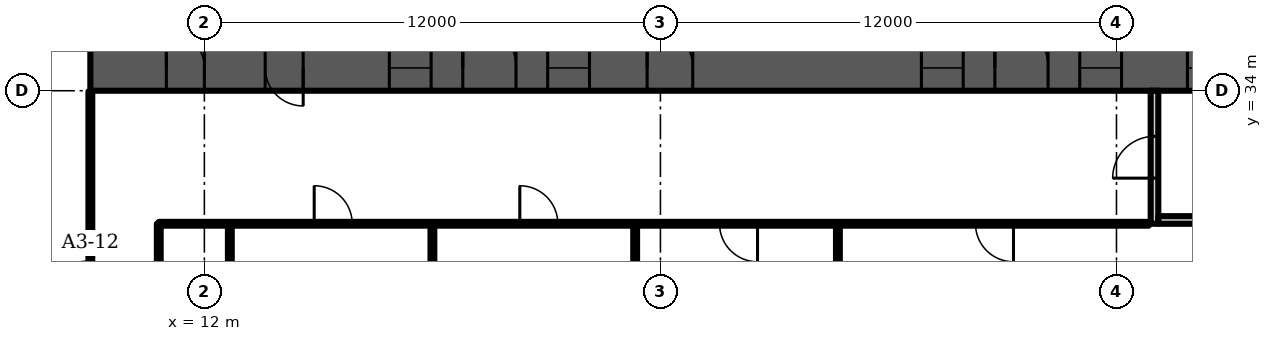
"""IFC4 building model, lengths in metres.
Left out: names, types, materials, properties, quantities, classifications, styles, units other than length and angle.
Written with IfcOpenShell. Run it as: python <this file> out.ifc"""

import sys

from ifc_helpers import new_model, si_unit, direction, frame, frame_2d, origin, place, context, subcontext, project, spatial, rectangle, extrude, element, fill, save


model = new_model("IFC4")
c1 = context("Model", 3, precision=1e-05, world=origin(), true_north=direction((0.0, 1.0)))
c2 = subcontext(c1, "Body", "Model", "MODEL_VIEW")
j1 = project(units=[si_unit("LENGTHUNIT", "METRE"), si_unit("PLANEANGLEUNIT", "RADIAN")], contexts=[c1])
p1 = place(None, origin())
s1 = spatial("IfcSite", under=j1, at=p1, CompositionType="ELEMENT")
p2 = place(p1, origin())
s2 = spatial("IfcBuilding", under=s1, at=p2, CompositionType="ELEMENT")
p3 = place(p2, frame((0.0, 0.0, 66.7)))
s3 = spatial("IfcBuildingStorey", under=s2, at=p3, CompositionType="ELEMENT", Elevation=66.7)
p4 = place(p3, frame((9.0, 34.6, 0.0), z_axis=(0.0, 0.0, 1.0), x_axis=(1.0, 0.0, 0.0)))
e1 = element("IfcWall", 1, at=p4, inside=s3, PredefinedType="SHEAR", context=c2, shape_type="SweptSolid", body=[
    extrude(rectangle(XDim=56.0, YDim=1.2, at=frame_2d((28.0, 0.0))), origin(), (0.0, 0.0, 1.0), 3.6),
])
p5 = place(p4, frame((2.0, 0.0, 0.0)))
e2 = element("IfcOpeningElement", 2, at=p5, cuts=e1, PredefinedType="OPENING", context=c2, shape_type="SweptSolid", body=[
    extrude(rectangle(XDim=1.0, YDim=2.1, at=frame_2d((0.5, 1.05))), frame((0.0, 0.61, 0.0), z_axis=(0.0, -1.0, 0.0), x_axis=(1.0, 0.0, 0.0)), (0.0, 0.0, 1.0), 1.22),
])
p6 = place(p4, frame((4.6, 0.0, 0.0)))
e3 = element("IfcOpeningElement", 3, at=p6, cuts=e1, PredefinedType="OPENING", context=c2, shape_type="SweptSolid", body=[
    extrude(rectangle(XDim=1.0, YDim=2.1, at=frame_2d((0.5, 1.05))), frame((0.0, 0.61, 0.0), z_axis=(0.0, -1.0, 0.0), x_axis=(1.0, 0.0, 0.0)), (0.0, 0.0, 1.0), 1.22),
])
p7 = place(p4, frame((7.867, 0.0, 0.0)))
e4 = element("IfcOpeningElement", 4, at=p7, cuts=e1, PredefinedType="OPENING", context=c2, shape_type="SweptSolid", body=[
    extrude(rectangle(XDim=1.1, YDim=2.1, at=frame_2d((0.55, 1.05))), frame((0.0, 0.61, 0.0), z_axis=(0.0, -1.0, 0.0), x_axis=(1.0, 0.0, 0.0)), (0.0, 0.0, 1.0), 1.22),
])
p8 = place(p4, frame((12.033, 0.0, 0.0)))
e5 = element("IfcOpeningElement", 5, at=p8, cuts=e1, PredefinedType="OPENING", context=c2, shape_type="SweptSolid", body=[
    extrude(rectangle(XDim=1.1, YDim=2.1, at=frame_2d((0.55, 1.05))), frame((0.0, 0.61, 0.0), z_axis=(0.0, -1.0, 0.0), x_axis=(1.0, 0.0, 0.0)), (0.0, 0.0, 1.0), 1.22),
])
p9 = place(p4, frame((9.8, 0.0, 0.0)))
e6 = element("IfcOpeningElement", 6, at=p9, cuts=e1, PredefinedType="OPENING", context=c2, shape_type="SweptSolid", body=[
    extrude(rectangle(XDim=1.4, YDim=2.1, at=frame_2d((0.7, 1.05))), frame((0.0, 0.61, 0.0), z_axis=(0.0, -1.0, 0.0), x_axis=(1.0, 0.0, 0.0)), (0.0, 0.0, 1.0), 1.22),
])
p10 = place(p4, frame((14.65, 0.0, 0.0)))
e7 = element("IfcOpeningElement", 7, at=p10, cuts=e1, PredefinedType="OPENING", context=c2, shape_type="SweptSolid", body=[
    extrude(rectangle(XDim=1.2, YDim=2.1, at=frame_2d((0.6, 1.05))), frame((0.0, 0.61, 0.0), z_axis=(0.0, -1.0, 0.0), x_axis=(1.0, 0.0, 0.0)), (0.0, 0.0, 1.0), 1.22),
])
p11 = place(p4, frame((21.867, 0.0, 0.0)))
e8 = element("IfcOpeningElement", 8, at=p11, cuts=e1, PredefinedType="OPENING", context=c2, shape_type="SweptSolid", body=[
    extrude(rectangle(XDim=1.1, YDim=2.1, at=frame_2d((0.55, 1.05))), frame((0.0, 0.61, 0.0), z_axis=(0.0, -1.0, 0.0), x_axis=(1.0, 0.0, 0.0)), (0.0, 0.0, 1.0), 1.22),
])
p12 = place(p4, frame((26.033, 0.0, 0.0)))
e9 = element("IfcOpeningElement", 9, at=p12, cuts=e1, PredefinedType="OPENING", context=c2, shape_type="SweptSolid", body=[
    extrude(rectangle(XDim=1.1, YDim=2.1, at=frame_2d((0.55, 1.05))), frame((0.0, 0.61, 0.0), z_axis=(0.0, -1.0, 0.0), x_axis=(1.0, 0.0, 0.0)), (0.0, 0.0, 1.0), 1.22),
])
p13 = place(p4, frame((23.8, 0.0, 0.0)))
e10 = element("IfcOpeningElement", 10, at=p13, cuts=e1, PredefinedType="OPENING", context=c2, shape_type="SweptSolid", body=[
    extrude(rectangle(XDim=1.4, YDim=2.1, at=frame_2d((0.7, 1.05))), frame((0.0, 0.61, 0.0), z_axis=(0.0, -1.0, 0.0), x_axis=(1.0, 0.0, 0.0)), (0.0, 0.0, 1.0), 1.22),
])
p14 = place(p4, frame((28.867, 0.0, 0.0)))
e11 = element("IfcOpeningElement", 11, at=p14, cuts=e1, PredefinedType="OPENING", context=c2, shape_type="SweptSolid", body=[
    extrude(rectangle(XDim=1.1, YDim=2.1, at=frame_2d((0.55, 1.05))), frame((0.0, 0.61, 0.0), z_axis=(0.0, -1.0, 0.0), x_axis=(1.0, 0.0, 0.0)), (0.0, 0.0, 1.0), 1.22),
])
p15 = place(p4, frame((33.033, 0.0, 0.0)))
e12 = element("IfcOpeningElement", 12, at=p15, cuts=e1, PredefinedType="OPENING", context=c2, shape_type="SweptSolid", body=[
    extrude(rectangle(XDim=1.1, YDim=2.1, at=frame_2d((0.55, 1.05))), frame((0.0, 0.61, 0.0), z_axis=(0.0, -1.0, 0.0), x_axis=(1.0, 0.0, 0.0)), (0.0, 0.0, 1.0), 1.22),
])
p16 = place(p4, frame((40.15, 0.0, 0.0)))
e13 = element("IfcOpeningElement", 13, at=p16, cuts=e1, PredefinedType="OPENING", context=c2, shape_type="SweptSolid", body=[
    extrude(rectangle(XDim=1.2, YDim=2.1, at=frame_2d((0.6, 1.05))), frame((0.0, 0.61, 0.0), z_axis=(0.0, -1.0, 0.0), x_axis=(1.0, 0.0, 0.0)), (0.0, 0.0, 1.0), 1.22),
])
p17 = place(p4, frame((44.8, 0.0, 0.0)))
e14 = element("IfcOpeningElement", 14, at=p17, cuts=e1, PredefinedType="OPENING", context=c2, shape_type="SweptSolid", body=[
    extrude(rectangle(XDim=1.4, YDim=2.1, at=frame_2d((0.7, 1.05))), frame((0.0, 0.61, 0.0), z_axis=(0.0, -1.0, 0.0), x_axis=(1.0, 0.0, 0.0)), (0.0, 0.0, 1.0), 1.22),
])
p18 = place(p4, frame((49.867, 0.0, 0.0)))
e15 = element("IfcOpeningElement", 15, at=p18, cuts=e1, PredefinedType="OPENING", context=c2, shape_type="SweptSolid", body=[
    extrude(rectangle(XDim=1.1, YDim=2.1, at=frame_2d((0.55, 1.05))), frame((0.0, 0.61, 0.0), z_axis=(0.0, -1.0, 0.0), x_axis=(1.0, 0.0, 0.0)), (0.0, 0.0, 1.0), 1.22),
])
p19 = place(p4, frame((53.5, 0.0, 0.0)))
e16 = element("IfcOpeningElement", 16, at=p19, cuts=e1, PredefinedType="OPENING", context=c2, shape_type="SweptSolid", body=[
    extrude(rectangle(XDim=1.1, YDim=2.1, at=frame_2d((0.55, 1.05))), frame((0.0, 0.61, 0.0), z_axis=(0.0, -1.0, 0.0), x_axis=(1.0, 0.0, 0.0)), (0.0, 0.0, 1.0), 1.22),
])
p20 = place(p4, frame((51.567, 0.0, 0.0)))
e17 = element("IfcOpeningElement", 17, at=p20, cuts=e1, PredefinedType="OPENING", context=c2, shape_type="SweptSolid", body=[
    extrude(rectangle(XDim=1.4, YDim=2.1, at=frame_2d((0.7, 1.05))), frame((0.0, 0.61, 0.0), z_axis=(0.0, -1.0, 0.0), x_axis=(1.0, 0.0, 0.0)), (0.0, 0.0, 1.0), 1.22),
])
p21 = place(p3, frame((37.0, 30.5, 0.0), z_axis=(0.0, 0.0, 1.0), x_axis=(0.0, 1.0, 0.0)))
e18 = element("IfcWall", 18, at=p21, inside=s3, PredefinedType="PARTITIONING", context=c2, shape_type="SweptSolid", body=[
    extrude(rectangle(XDim=3.5, YDim=0.2, at=frame_2d((1.75, 0.0))), origin(), (0.0, 0.0, 1.0), 3.2),
])
p22 = place(p21, frame((1.2, 0.0, 0.0)))
e19 = element("IfcOpeningElement", 19, at=p22, cuts=e18, PredefinedType="OPENING", context=c2, shape_type="SweptSolid", body=[
    extrude(rectangle(XDim=1.1, YDim=2.1, at=frame_2d((0.55, 1.05))), frame((0.0, 0.11, 0.0), z_axis=(0.0, -1.0, 0.0), x_axis=(1.0, 0.0, 0.0)), (0.0, 0.0, 1.0), 0.22),
])
p23 = place(p3, frame((37.1, 30.6, 0.0), z_axis=(0.0, 0.0, 1.0), x_axis=(1.0, 0.0, 0.0)))
e20 = element("IfcWall", 20, at=p23, inside=s3, PredefinedType="PARTITIONING", context=c2, shape_type="SweptSolid", body=[
    extrude(rectangle(XDim=2.8, YDim=0.2, at=frame_2d((1.4, 0.0))), origin(), (0.0, 0.0, 1.0), 3.2),
])
p24 = place(p3, frame((9.0, 26.02, 0.0), z_axis=(0.0, 0.0, 1.0), x_axis=(0.0, 1.0, 0.0)))
e21 = element("IfcWall", 21, at=p24, inside=s3, PredefinedType="PARTITIONING", context=c2, shape_type="SweptSolid", body=[
    extrude(rectangle(XDim=7.96, YDim=0.1, at=frame_2d((3.98, 0.0))), origin(), (0.0, 0.0, 1.0), 3.2),
])
p25 = place(p24, frame((1.7, 0.0, 0.0)))
e22 = element("IfcOpeningElement", 22, at=p25, cuts=e21, PredefinedType="OPENING", context=c2, shape_type="SweptSolid", body=[
    extrude(rectangle(XDim=1.8, YDim=2.1, at=frame_2d((0.9, 1.05))), frame((0.0, 0.06, 0.0), z_axis=(0.0, -1.0, 0.0), x_axis=(1.0, 0.0, 0.0)), (0.0, 0.0, 1.0), 0.12),
])
p26 = place(p3, frame((10.8, 21.35, 0.0), z_axis=(0.0, 0.0, 1.0), x_axis=(0.0, 1.0, 0.0)))
e23 = element("IfcWall", 23, at=p26, inside=s3, PredefinedType="PARTITIONING", context=c2, shape_type="SweptSolid", body=[
    extrude(rectangle(XDim=9.15, YDim=0.1, at=frame_2d((4.575, 0.0))), origin(), (0.0, 0.0, 1.0), 3.2),
])
p27 = place(p26, frame((3.62, 0.0, 0.0)))
e24 = element("IfcOpeningElement", 24, at=p27, cuts=e23, PredefinedType="OPENING", context=c2, shape_type="SweptSolid", body=[
    extrude(rectangle(XDim=1.8, YDim=2.1, at=frame_2d((0.9, 1.05))), frame((0.0, 0.06, 0.0), z_axis=(0.0, -1.0, 0.0), x_axis=(1.0, 0.0, 0.0)), (0.0, 0.0, 1.0), 0.12),
])
p28 = place(p3, frame((10.8, 30.5, 0.0), z_axis=(0.0, 0.0, 1.0), x_axis=(1.0, 0.0, 0.0)))
e25 = element("IfcWall", 25, at=p28, inside=s3, PredefinedType="PARTITIONING", context=c2, shape_type="SweptSolid", body=[
    extrude(rectangle(XDim=26.05, YDim=0.1, at=frame_2d((13.025, 0.0))), origin(), (0.0, 0.0, 1.0), 3.2),
])
p29 = place(p28, frame((4.09, 0.0, 0.0)))
e26 = element("IfcOpeningElement", 26, at=p29, cuts=e25, PredefinedType="OPENING", context=c2, shape_type="SweptSolid", body=[
    extrude(rectangle(XDim=1.0, YDim=2.1, at=frame_2d((0.5, 1.05))), frame((0.0, 0.06, 0.0), z_axis=(0.0, -1.0, 0.0), x_axis=(1.0, 0.0, 0.0)), (0.0, 0.0, 1.0), 0.12),
])
p30 = place(p28, frame((9.5, 0.0, 0.0)))
e27 = element("IfcOpeningElement", 27, at=p30, cuts=e25, PredefinedType="OPENING", context=c2, shape_type="SweptSolid", body=[
    extrude(rectangle(XDim=1.0, YDim=2.1, at=frame_2d((0.5, 1.05))), frame((0.0, 0.06, 0.0), z_axis=(0.0, -1.0, 0.0), x_axis=(1.0, 0.0, 0.0)), (0.0, 0.0, 1.0), 0.12),
])
p31 = place(p28, frame((14.755, 0.0, 0.0)))
e28 = element("IfcOpeningElement", 28, at=p31, cuts=e25, PredefinedType="OPENING", context=c2, shape_type="SweptSolid", body=[
    extrude(rectangle(XDim=1.0, YDim=2.1, at=frame_2d((0.5, 1.05))), frame((0.0, 0.06, 0.0), z_axis=(0.0, -1.0, 0.0), x_axis=(1.0, 0.0, 0.0)), (0.0, 0.0, 1.0), 0.12),
])
p32 = place(p28, frame((21.49, 0.0, 0.0)))
e29 = element("IfcOpeningElement", 29, at=p32, cuts=e25, PredefinedType="OPENING", context=c2, shape_type="SweptSolid", body=[
    extrude(rectangle(XDim=1.0, YDim=2.1, at=frame_2d((0.5, 1.05))), frame((0.0, 0.06, 0.0), z_axis=(0.0, -1.0, 0.0), x_axis=(1.0, 0.0, 0.0)), (0.0, 0.0, 1.0), 0.12),
])
p33 = place(p3, frame((12.67, -1.088, 0.0), z_axis=(0.0, 0.0, 1.0), x_axis=(0.0, 1.0, 0.0)))
e30 = element("IfcWall", 30, at=p33, inside=s3, PredefinedType="PARTITIONING", context=c2, shape_type="SweptSolid", body=[
    extrude(rectangle(XDim=31.588, YDim=0.1, at=frame_2d((15.794, 0.0))), origin(), (0.0, 0.0, 1.0), 3.2),
])
p34 = place(p3, frame((18.0, -0.94, 0.0), z_axis=(0.0, 0.0, 1.0), x_axis=(0.0, 1.0, 0.0)))
e31 = element("IfcWall", 31, at=p34, inside=s3, PredefinedType="PARTITIONING", context=c2, shape_type="SweptSolid", body=[
    extrude(rectangle(XDim=31.44, YDim=0.1, at=frame_2d((15.72, 0.0))), origin(), (0.0, 0.0, 1.0), 3.2),
])
p35 = place(p3, frame((23.335, -1.41, 0.0), z_axis=(0.0, 0.0, 1.0), x_axis=(0.0, 1.0, 0.0)))
e32 = element("IfcWall", 32, at=p35, inside=s3, PredefinedType="PARTITIONING", context=c2, shape_type="SweptSolid", body=[
    extrude(rectangle(XDim=31.91, YDim=0.1, at=frame_2d((15.955, 0.0))), origin(), (0.0, 0.0, 1.0), 3.2),
])
p36 = place(p3, frame((28.67, -1.875, 0.0), z_axis=(0.0, 0.0, 1.0), x_axis=(0.0, 1.0, 0.0)))
e33 = element("IfcWall", 33, at=p36, inside=s3, PredefinedType="PARTITIONING", context=c2, shape_type="SweptSolid", body=[
    extrude(rectangle(XDim=32.375, YDim=0.1, at=frame_2d((16.188, 0.0))), origin(), (0.0, 0.0, 1.0), 3.2),
])
p37 = place(p5, origin())
e34 = element("IfcDoor", 34, at=p37, inside=s3, OperationType="SINGLE_SWING_LEFT", PredefinedType="DOOR", context=c2, shape_type="SweptSolid", body=[
    extrude(rectangle(XDim=1.0, YDim=2.1, at=frame_2d((0.5, 1.05))), frame((0.0, 0.6, 0.0), z_axis=(0.0, -1.0, 0.0), x_axis=(1.0, 0.0, 0.0)), (0.0, 0.0, 1.0), 1.199),
])
fill(e2, e34)
p38 = place(p6, origin())
e35 = element("IfcDoor", 35, at=p38, inside=s3, OperationType="SINGLE_SWING_RIGHT", PredefinedType="DOOR", context=c2, shape_type="SweptSolid", body=[
    extrude(rectangle(XDim=1.0, YDim=2.1, at=frame_2d((0.5, 1.05))), frame((0.0, 0.6, 0.0), z_axis=(0.0, -1.0, 0.0), x_axis=(1.0, 0.0, 0.0)), (0.0, 0.0, 1.0), 1.199),
])
fill(e3, e35)
p39 = place(p7, origin())
e36 = element("IfcDoor", 36, at=p39, inside=s3, OperationType="DOUBLE_DOOR_SLIDING", PredefinedType="DOOR", context=c2, shape_type="SweptSolid", body=[
    extrude(rectangle(XDim=1.1, YDim=2.1, at=frame_2d((0.55, 1.05))), frame((0.0, 0.025, 0.0), z_axis=(0.0, -1.0, 0.0), x_axis=(1.0, 0.0, 0.0)), (0.0, 0.0, 1.0), 0.05),
])
fill(e4, e36)
p40 = place(p8, origin())
e37 = element("IfcDoor", 37, at=p40, inside=s3, OperationType="DOUBLE_DOOR_SLIDING", PredefinedType="DOOR", context=c2, shape_type="SweptSolid", body=[
    extrude(rectangle(XDim=1.1, YDim=2.1, at=frame_2d((0.55, 1.05))), frame((0.0, 0.025, 0.0), z_axis=(0.0, -1.0, 0.0), x_axis=(1.0, 0.0, 0.0)), (0.0, 0.0, 1.0), 0.05),
])
fill(e5, e37)
p41 = place(p9, origin())
e38 = element("IfcDoor", 38, at=p41, inside=s3, OperationType="DOUBLE_DOOR_SINGLE_SWING", PredefinedType="DOOR", context=c2, shape_type="SweptSolid", body=[
    extrude(rectangle(XDim=1.4, YDim=2.1, at=frame_2d((0.7, 1.05))), frame((0.0, 0.025, 0.0), z_axis=(0.0, -1.0, 0.0), x_axis=(1.0, 0.0, 0.0)), (0.0, 0.0, 1.0), 0.05),
])
fill(e6, e38)
p42 = place(p10, origin())
e39 = element("IfcDoor", 39, at=p42, inside=s3, OperationType="SINGLE_SWING_LEFT", PredefinedType="DOOR", context=c2, shape_type="SweptSolid", body=[
    extrude(rectangle(XDim=1.2, YDim=2.1, at=frame_2d((0.6, 1.05))), frame((0.0, 0.025, 0.0), z_axis=(0.0, -1.0, 0.0), x_axis=(1.0, 0.0, 0.0)), (0.0, 0.0, 1.0), 0.05),
])
fill(e7, e39)
p43 = place(p11, origin())
e40 = element("IfcDoor", 40, at=p43, inside=s3, OperationType="DOUBLE_DOOR_SLIDING", PredefinedType="DOOR", context=c2, shape_type="SweptSolid", body=[
    extrude(rectangle(XDim=1.1, YDim=2.1, at=frame_2d((0.55, 1.05))), frame((0.0, 0.025, 0.0), z_axis=(0.0, -1.0, 0.0), x_axis=(1.0, 0.0, 0.0)), (0.0, 0.0, 1.0), 0.05),
])
fill(e8, e40)
p44 = place(p12, origin())
e41 = element("IfcDoor", 41, at=p44, inside=s3, OperationType="DOUBLE_DOOR_SLIDING", PredefinedType="DOOR", context=c2, shape_type="SweptSolid", body=[
    extrude(rectangle(XDim=1.1, YDim=2.1, at=frame_2d((0.55, 1.05))), frame((0.0, 0.025, 0.0), z_axis=(0.0, -1.0, 0.0), x_axis=(1.0, 0.0, 0.0)), (0.0, 0.0, 1.0), 0.05),
])
fill(e9, e41)
p45 = place(p13, origin())
e42 = element("IfcDoor", 42, at=p45, inside=s3, OperationType="DOUBLE_DOOR_SINGLE_SWING", PredefinedType="DOOR", context=c2, shape_type="SweptSolid", body=[
    extrude(rectangle(XDim=1.4, YDim=2.1, at=frame_2d((0.7, 1.05))), frame((0.0, 0.025, 0.0), z_axis=(0.0, -1.0, 0.0), x_axis=(1.0, 0.0, 0.0)), (0.0, 0.0, 1.0), 0.05),
])
fill(e10, e42)
p46 = place(p14, origin())
e43 = element("IfcDoor", 43, at=p46, inside=s3, OperationType="DOUBLE_DOOR_SLIDING", PredefinedType="DOOR", context=c2, shape_type="SweptSolid", body=[
    extrude(rectangle(XDim=1.1, YDim=2.1, at=frame_2d((0.55, 1.05))), frame((0.0, 0.025, 0.0), z_axis=(0.0, -1.0, 0.0), x_axis=(1.0, 0.0, 0.0)), (0.0, 0.0, 1.0), 0.05),
])
fill(e11, e43)
p47 = place(p22, origin())
e44 = element("IfcDoor", 44, at=p47, inside=s3, OperationType="SINGLE_SWING_LEFT", PredefinedType="DOOR", context=c2, shape_type="SweptSolid", body=[
    extrude(rectangle(XDim=1.1, YDim=2.1, at=frame_2d((0.55, 1.05))), frame((0.0, 0.025, 0.0), z_axis=(0.0, -1.0, 0.0), x_axis=(1.0, 0.0, 0.0)), (0.0, 0.0, 1.0), 0.05),
])
fill(e19, e44)
p48 = place(p25, origin())
e45 = element("IfcDoor", 45, at=p48, inside=s3, OperationType="DOUBLE_DOOR_SINGLE_SWING", PredefinedType="DOOR", context=c2, shape_type="SweptSolid", body=[
    extrude(rectangle(XDim=1.8, YDim=2.1, at=frame_2d((0.9, 1.05))), frame((0.0, 0.025, 0.0), z_axis=(0.0, -1.0, 0.0), x_axis=(1.0, 0.0, 0.0)), (0.0, 0.0, 1.0), 0.05),
])
fill(e22, e45)
p49 = place(p29, origin())
e46 = element("IfcDoor", 46, at=p49, inside=s3, OperationType="SINGLE_SWING_LEFT", PredefinedType="DOOR", context=c2, shape_type="SweptSolid", body=[
    extrude(rectangle(XDim=1.0, YDim=2.1, at=frame_2d((0.5, 1.05))), frame((0.0, 0.025, 0.0), z_axis=(0.0, -1.0, 0.0), x_axis=(1.0, 0.0, 0.0)), (0.0, 0.0, 1.0), 0.05),
])
fill(e26, e46)
p50 = place(p30, origin())
e47 = element("IfcDoor", 47, at=p50, inside=s3, OperationType="SINGLE_SWING_LEFT", PredefinedType="DOOR", context=c2, shape_type="SweptSolid", body=[
    extrude(rectangle(XDim=1.0, YDim=2.1, at=frame_2d((0.5, 1.05))), frame((0.0, 0.025, 0.0), z_axis=(0.0, -1.0, 0.0), x_axis=(1.0, 0.0, 0.0)), (0.0, 0.0, 1.0), 0.05),
])
fill(e27, e47)
p51 = place(p31, origin())
e48 = element("IfcDoor", 48, at=p51, inside=s3, OperationType="SINGLE_SWING_RIGHT", PredefinedType="DOOR", context=c2, shape_type="SweptSolid", body=[
    extrude(rectangle(XDim=1.0, YDim=2.1, at=frame_2d((0.5, 1.05))), frame((0.0, 0.025, 0.0), z_axis=(0.0, -1.0, 0.0), x_axis=(1.0, 0.0, 0.0)), (0.0, 0.0, 1.0), 0.05),
])
fill(e28, e48)
p52 = place(p32, origin())
e49 = element("IfcDoor", 49, at=p52, inside=s3, OperationType="SINGLE_SWING_RIGHT", PredefinedType="DOOR", context=c2, shape_type="SweptSolid", body=[
    extrude(rectangle(XDim=1.0, YDim=2.1, at=frame_2d((0.5, 1.05))), frame((0.0, 0.025, 0.0), z_axis=(0.0, -1.0, 0.0), x_axis=(1.0, 0.0, 0.0)), (0.0, 0.0, 1.0), 0.05),
])
fill(e29, e49)
save(model, sys.argv[1])
